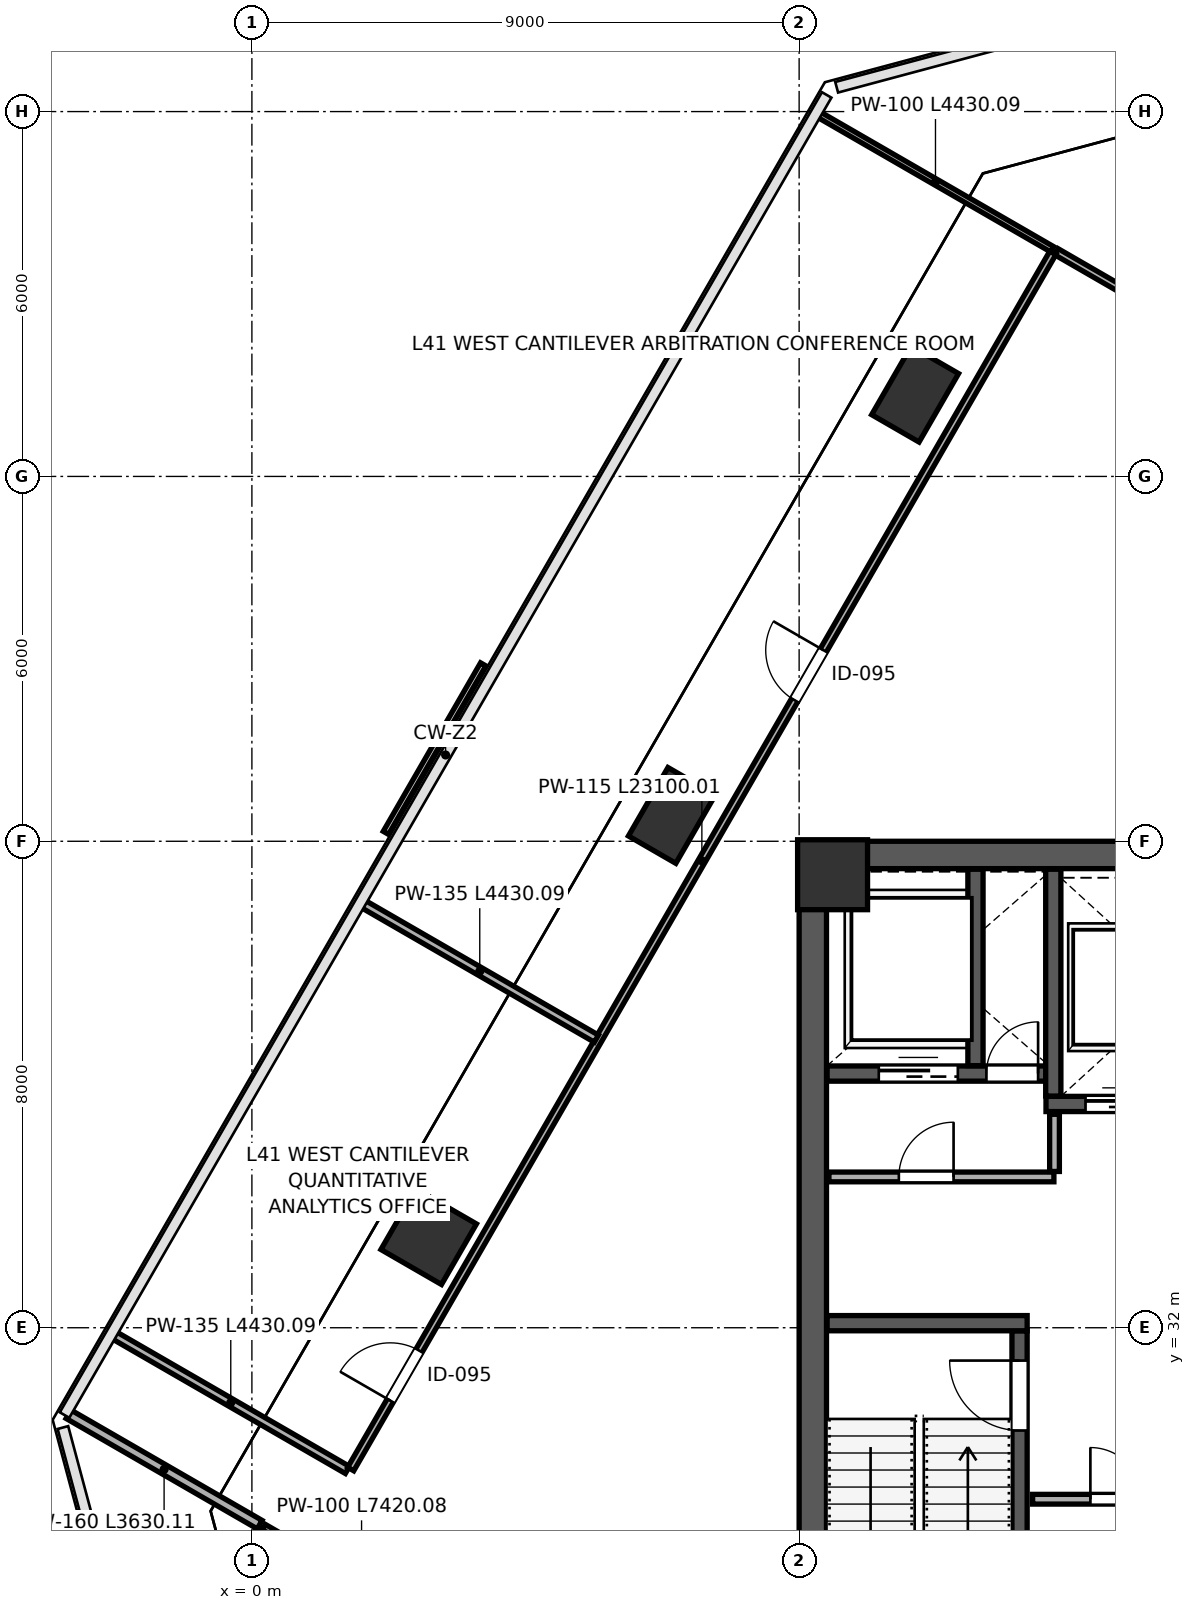
"""IFC4 building model, lengths in metres.
Left out: names, types, materials, properties, quantities, classifications, styles, units other than length and angle.
Written with IfcOpenShell. Run it as: python <this file> out.ifc"""

import sys

from ifc_helpers import new_model, si_unit, direction, frame, frame_2d, origin, origin_2d, place, context, subcontext, project, spatial, rectangle, extrude, clip, halfspace, source, transform, mapped, element, fill, save


model = new_model("IFC4")
c1 = context("Model", 3, precision=1e-05, world=origin(), true_north=direction((0.0, 1.0)))
c2 = subcontext(c1, "Body", "Model", "MODEL_VIEW")
j1 = project(units=[si_unit("LENGTHUNIT", "METRE"), si_unit("PLANEANGLEUNIT", "RADIAN")], contexts=[c1])
p1 = place(None, origin())
s1 = spatial("IfcSite", under=j1, at=p1, CompositionType="ELEMENT")
p2 = place(p1, origin())
s2 = spatial("IfcBuilding", under=s1, at=p2, CompositionType="ELEMENT")
p3 = place(p2, frame((0.0, 0.0, 183.4)))
s3 = spatial("IfcBuildingStorey", under=s2, at=p3, CompositionType="ELEMENT", Elevation=183.4)
m1 = source(origin(), c2, "Body", "SweptSolid", [
    extrude(rectangle(XDim=1.15, YDim=1.15, at=origin_2d()), origin(), (0.0, 0.0, 1.0), 4.199),
])
p4 = place(p3, frame((9.55, 39.45, 0.001), z_axis=(0.0, 0.0, 1.0), x_axis=(1.0, 0.0, 0.0)))
e1 = element("IfcColumn", 1, at=p4, inside=s3, PredefinedType="COLUMN", context=c2, shape_type="MappedRepresentation", body=[
    mapped(m1, transform((0.0, 0.0, 0.0), scale=1.0)),
])
p5 = place(p3, frame((2.907, 33.497, 0.0), z_axis=(0.019402010534, 0.18922666744, 0.981741733002), x_axis=(0.811440649841, -0.576643979736, 0.095109370836)))
e2 = element("IfcColumn", 2, at=p5, inside=s3, PredefinedType="COLUMN", context=c2, shape_type="Clipping", body=[
    clip(clip(extrude(rectangle(XDim=1.15, YDim=1.15, at=origin_2d()), origin(), (0.0, 0.0, 1.0), 4.278), halfspace(frame((0.0, 0.0, 0.153), z_axis=(0.0, 0.0, -1.0), x_axis=(1.0, 0.0, 0.0)), False)), halfspace(frame((0.0, 0.0, 4.125), z_axis=(0.0, 0.0, 1.0), x_axis=(1.0, 0.0, 0.0)), False)),
])
p6 = place(p3, frame((6.907, 40.425, 0.0), z_axis=(0.089433565091, 0.147376438249, 0.985028843681), x_axis=(0.484857640609, -0.870335294047, 0.086194804246)))
e3 = element("IfcColumn", 3, at=p6, inside=s3, PredefinedType="PILASTER", context=c2, shape_type="Clipping", body=[
    clip(clip(extrude(rectangle(XDim=0.9, YDim=1.3, at=origin_2d()), origin(), (0.0, 0.0, 1.0), 4.264), halfspace(frame((0.0, 0.0, 0.139), z_axis=(0.0, 0.0, -1.0), x_axis=(1.0, 0.0, 0.0)), False)), halfspace(frame((0.0, 0.0, 4.125), z_axis=(0.0, 0.0, 1.0), x_axis=(1.0, 0.0, 0.0)), False)),
])
p7 = place(p3, frame((10.907, 47.353, 0.0), z_axis=(0.158925035216, 0.104542428911, 0.981740145731), x_axis=(0.065841652164, -0.993286617888, 0.095113466792)))
e4 = element("IfcColumn", 4, at=p7, inside=s3, PredefinedType="PILASTER", context=c2, shape_type="Clipping", body=[
    clip(clip(extrude(rectangle(XDim=0.9, YDim=1.3, at=origin_2d()), origin(), (0.0, 0.0, 1.0), 4.278), halfspace(frame((0.0, 0.0, 0.153), z_axis=(0.0, 0.0, -1.0), x_axis=(1.0, 0.0, 0.0)), False)), halfspace(frame((0.0, 0.0, 4.125), z_axis=(0.0, 0.0, 1.0), x_axis=(1.0, 0.0, 0.0)), False)),
])
p8 = place(p3, frame((9.225, 24.45, 0.0), z_axis=(0.0, 0.0, 1.0), x_axis=(0.0, 1.0, 0.0)))
e5 = element("IfcWall", 5, at=p8, inside=s3, PredefinedType="SHEAR", context=c2, shape_type="SweptSolid", body=[
    extrude(rectangle(XDim=15.1, YDim=0.45, at=frame_2d((7.55, 0.0))), origin(), (0.0, 0.0, 1.0), 3.96),
])
p9 = place(p3, frame((9.0, 39.775, 0.0), z_axis=(0.0, 0.0, 1.0), x_axis=(1.0, 0.0, 0.0)))
e6 = element("IfcWall", 6, at=p9, inside=s3, PredefinedType="SHEAR", context=c2, shape_type="SweptSolid", body=[
    extrude(rectangle(XDim=18.0, YDim=0.45, at=frame_2d((9.0, 0.0))), origin(), (0.0, 0.0, 1.0), 3.96),
])
p10 = place(p3, frame((12.625, 24.46, 0.0), z_axis=(0.0, 0.0, 1.0), x_axis=(0.0, 1.0, 0.0)))
e7 = element("IfcWall", 7, at=p10, inside=s3, PredefinedType="SHEAR", context=c2, shape_type="SweptSolid", body=[
    extrude(rectangle(XDim=7.49, YDim=0.25, at=frame_2d((3.745, 0.0))), origin(), (0.0, 0.0, 1.0), 3.96),
])
p11 = place(p10, frame((5.85, 0.0, 0.0)))
e8 = element("IfcOpeningElement", 8, at=p11, cuts=e7, PredefinedType="OPENING", context=c2, shape_type="SweptSolid", body=[
    extrude(rectangle(XDim=1.15, YDim=2.2, at=frame_2d((0.575, 1.1))), frame((0.0, 0.135, 0.0), z_axis=(0.0, -1.0, 0.0), x_axis=(1.0, 0.0, 0.0)), (0.0, 0.0, 1.0), 0.27),
])
p12 = place(p3, frame((9.46, 32.075, 0.0), z_axis=(0.0, 0.0, 1.0), x_axis=(1.0, 0.0, 0.0)))
e9 = element("IfcWall", 9, at=p12, inside=s3, PredefinedType="SHEAR", context=c2, shape_type="SweptSolid", body=[
    extrude(rectangle(XDim=3.29, YDim=0.25, at=frame_2d((1.645, 0.0))), origin(), (0.0, 0.0, 1.0), 3.96),
])
p13 = place(p3, frame((9.46, 36.18, 0.0), z_axis=(0.0, 0.0, 1.0), x_axis=(1.0, 0.0, 0.0)))
e10 = element("IfcWall", 10, at=p13, inside=s3, PredefinedType="SHEAR", context=c2, shape_type="SweptSolid", body=[
    extrude(rectangle(XDim=3.79, YDim=0.25, at=frame_2d((1.895, 0.0))), origin(), (0.0, 0.0, 1.0), 3.96),
])
p14 = place(p13, frame((2.62, 0.0, 0.0)))
e11 = element("IfcOpeningElement", 11, at=p14, cuts=e10, PredefinedType="OPENING", context=c2, shape_type="SweptSolid", body=[
    extrude(rectangle(XDim=0.85, YDim=2.1, at=frame_2d((0.425, 1.05))), frame((0.0, 0.135, 0.0), z_axis=(0.0, -1.0, 0.0), x_axis=(1.0, 0.0, 0.0)), (0.0, 0.0, 1.0), 0.27),
])
p15 = place(p13, frame((0.85, 0.0, 0.0)))
e12 = element("IfcOpeningElement", 12, at=p15, cuts=e10, PredefinedType="OPENING", context=c2, shape_type="SweptSolid", body=[
    extrude(rectangle(XDim=1.3, YDim=2.25, at=frame_2d((0.65, 1.125))), frame((0.0, 0.135, 0.0), z_axis=(0.0, -1.0, 0.0), x_axis=(1.0, 0.0, 0.0)), (0.0, 0.0, 1.0), 0.27),
])
p16 = place(p3, frame((11.9, 36.31, 0.0), z_axis=(0.0, 0.0, 1.0), x_axis=(0.0, 1.0, 0.0)))
e13 = element("IfcWall", 13, at=p16, inside=s3, PredefinedType="SHEAR", context=c2, shape_type="SweptSolid", body=[
    extrude(rectangle(XDim=3.23, YDim=0.25, at=frame_2d((1.615, 0.0))), origin(), (0.0, 0.0, 1.0), 3.96),
])
p17 = place(p3, frame((13.06, 35.68, 0.0), z_axis=(0.0, 0.0, 1.0), x_axis=(1.0, 0.0, 0.0)))
e14 = element("IfcWall", 14, at=p17, inside=s3, PredefinedType="SHEAR", context=c2, shape_type="SweptSolid", body=[
    extrude(rectangle(XDim=4.25, YDim=0.25, at=frame_2d((2.125, 0.0))), origin(), (0.0, 0.0, 1.0), 3.96),
])
p18 = place(p17, frame((0.65, 0.0, 0.0)))
e15 = element("IfcOpeningElement", 15, at=p18, cuts=e14, PredefinedType="OPENING", context=c2, shape_type="SweptSolid", body=[
    extrude(rectangle(XDim=1.1, YDim=2.2, at=frame_2d((0.55, 1.1))), frame((0.0, 0.135, 0.0), z_axis=(0.0, -1.0, 0.0), x_axis=(1.0, 0.0, 0.0)), (0.0, 0.0, 1.0), 0.27),
])
p19 = place(p17, frame((2.65, 0.0, 0.0)))
e16 = element("IfcOpeningElement", 16, at=p19, cuts=e14, PredefinedType="OPENING", context=c2, shape_type="SweptSolid", body=[
    extrude(rectangle(XDim=1.1, YDim=2.2, at=frame_2d((0.55, 1.1))), frame((0.0, 0.135, 0.0), z_axis=(0.0, -1.0, 0.0), x_axis=(1.0, 0.0, 0.0)), (0.0, 0.0, 1.0), 0.27),
])
p20 = place(p3, frame((13.18, 35.81, 0.0), z_axis=(0.0, 0.0, 1.0), x_axis=(0.0, 1.0, 0.0)))
e17 = element("IfcWall", 17, at=p20, inside=s3, PredefinedType="SHEAR", context=c2, shape_type="SweptSolid", body=[
    extrude(rectangle(XDim=3.73, YDim=0.25, at=frame_2d((1.865, 0.0))), origin(), (0.0, 0.0, 1.0), 3.96),
])
p21 = place(p3, frame((9.49, 34.48, 0.0), z_axis=(0.0, 0.0, 1.0), x_axis=(1.0, 0.0, 0.0)))
e18 = element("IfcWall", 18, at=p21, inside=s3, PredefinedType="PARTITIONING", context=c2, shape_type="SweptSolid", body=[
    extrude(rectangle(XDim=3.7, YDim=0.16, at=frame_2d((1.85, 0.0))), origin(), (0.0, 0.0, 1.0), 3.96),
])
p22 = place(p21, frame((1.15, 0.0, 0.0)))
e19 = element("IfcOpeningElement", 19, at=p22, cuts=e18, PredefinedType="OPENING", context=c2, shape_type="SweptSolid", body=[
    extrude(rectangle(XDim=0.9, YDim=2.15, at=frame_2d((0.45, 1.075))), frame((0.0, 0.09, 0.0), z_axis=(0.0, -1.0, 0.0), x_axis=(1.0, 0.0, 0.0)), (0.0, 0.0, 1.0), 0.18),
])
p23 = place(p3, frame((13.2, 34.57, 0.0), z_axis=(0.0, 0.0, 1.0), x_axis=(0.0, 1.0, 0.0)))
e20 = element("IfcWall", 20, at=p23, inside=s3, PredefinedType="PARTITIONING", context=c2, shape_type="SweptSolid", body=[
    extrude(rectangle(XDim=0.94, YDim=0.16, at=frame_2d((0.47, 0.0))), origin(), (0.0, 0.0, 1.0), 3.96),
])
p24 = place(p3, frame((12.84, 29.18, 0.0), z_axis=(0.0, 0.0, 1.0), x_axis=(1.0, 0.0, 0.0)))
e21 = element("IfcWall", 21, at=p24, inside=s3, PredefinedType="PARTITIONING", context=c2, shape_type="SweptSolid", body=[
    extrude(rectangle(XDim=8.37, YDim=0.16, at=frame_2d((4.185, 0.0))), origin(), (0.0, 0.0, 1.0), 3.96),
])
p25 = place(p24, frame((0.95, 0.0, 0.0)))
e22 = element("IfcOpeningElement", 22, at=p25, cuts=e21, PredefinedType="OPENING", context=c2, shape_type="SweptSolid", body=[
    extrude(rectangle(XDim=0.85, YDim=2.1, at=frame_2d((0.425, 1.05))), frame((0.0, 0.09, 0.0), z_axis=(0.0, -1.0, 0.0), x_axis=(1.0, 0.0, 0.0)), (0.0, 0.0, 1.0), 0.18),
])
p26 = place(p24, frame((4.2, 0.0, 0.0)))
e23 = element("IfcOpeningElement", 23, at=p26, cuts=e21, PredefinedType="OPENING", context=c2, shape_type="SweptSolid", body=[
    extrude(rectangle(XDim=0.85, YDim=2.1, at=frame_2d((0.425, 1.05))), frame((0.0, 0.09, 0.0), z_axis=(0.0, -1.0, 0.0), x_axis=(1.0, 0.0, 0.0)), (0.0, 0.0, 1.0), 0.18),
])
p27 = place(p3, frame((-1.749, 25.432, 0.0), z_axis=(0.0, 0.0, 1.0), x_axis=(0.500013012896, 0.866017890655, 0.0)))
e24 = element("IfcWall", 24, at=p27, inside=s3, PredefinedType="PARTITIONING", context=c2, shape_type="SweptSolid", body=[
    extrude(rectangle(XDim=3.782, YDim=0.115, at=frame_2d((1.891, 0.0))), origin(), (0.0, 0.0, 1.0), 3.96),
])
p28 = place(p3, frame((-3.016, 30.577, 0.0), z_axis=(0.0, 0.0, 1.0), x_axis=(0.866011990707, -0.500023231413, 0.0)))
e25 = element("IfcWall", 25, at=p28, inside=s3, PredefinedType="PARTITIONING", context=c2, shape_type="SweptSolid", body=[
    extrude(rectangle(XDim=3.63, YDim=0.16, at=frame_2d((1.815, 0.0))), origin(), (0.0, 0.0, 1.0), 3.96),
])
p29 = place(p3, frame((0.197, 28.722, 0.0), z_axis=(0.0, 0.0, 1.0), x_axis=(0.866017374541, -0.5000139068, 0.0)))
e26 = element("IfcWall", 26, at=p29, inside=s3, PredefinedType="PARTITIONING", context=c2, shape_type="SweptSolid", body=[
    extrude(rectangle(XDim=7.42, YDim=0.1, at=frame_2d((3.71, 0.0))), origin(), (0.0, 0.0, 1.0), 3.96),
])
p30 = place(p29, frame((2.9, 0.0, 0.0)))
e27 = element("IfcOpeningElement", 27, at=p30, cuts=e26, PredefinedType="OPENING", context=c2, shape_type="SweptSolid", body=[
    extrude(rectangle(XDim=0.9, YDim=2.15, at=frame_2d((0.45, 1.075))), frame((0.0, 0.06, 0.0), z_axis=(0.0, -1.0, 0.0), x_axis=(1.0, 0.0, 0.0)), (0.0, 0.0, 1.0), 0.12),
])
p31 = place(p29, frame((5.0, 0.0, 0.0)))
e28 = element("IfcOpeningElement", 28, at=p31, cuts=e26, PredefinedType="OPENING", context=c2, shape_type="SweptSolid", body=[
    extrude(rectangle(XDim=0.95, YDim=2.15, at=frame_2d((0.475, 1.075))), frame((0.0, 0.06, 0.0), z_axis=(0.0, -1.0, 0.0), x_axis=(1.0, 0.0, 0.0)), (0.0, 0.0, 1.0), 0.12),
])
p32 = place(p3, frame((13.23, 49.696, 0.0), z_axis=(0.0, 0.0, 1.0), x_axis=(0.866026251752, -0.499998531275, 0.0)))
e29 = element("IfcWall", 29, at=p32, inside=s3, PredefinedType="PARTITIONING", context=c2, shape_type="SweptSolid", body=[
    extrude(rectangle(XDim=26.69, YDim=0.115, at=frame_2d((13.345, 0.0))), origin(), (0.0, 0.0, 1.0), 3.96),
])
p33 = place(p32, frame((2.1, 0.0, 0.0)))
e30 = element("IfcOpeningElement", 30, at=p33, cuts=e29, PredefinedType="OPENING", context=c2, shape_type="SweptSolid", body=[
    extrude(rectangle(XDim=0.95, YDim=2.15, at=frame_2d((0.475, 1.075))), frame((0.0, 0.067, 0.0), z_axis=(0.0, -1.0, 0.0), x_axis=(1.0, 0.0, 0.0)), (0.0, 0.0, 1.0), 0.135),
])
p34 = place(p32, frame((18.2, 0.0, 0.0)))
e31 = element("IfcOpeningElement", 31, at=p34, cuts=e29, PredefinedType="OPENING", context=c2, shape_type="SweptSolid", body=[
    extrude(rectangle(XDim=0.95, YDim=2.15, at=frame_2d((0.475, 1.075))), frame((0.0, 0.067, 0.0), z_axis=(0.0, -1.0, 0.0), x_axis=(1.0, 0.0, 0.0)), (0.0, 0.0, 1.0), 0.135),
])
p35 = place(p3, frame((-2.266, 31.876, 0.0), z_axis=(0.0, 0.0, 1.0), x_axis=(0.866026823135, -0.499997541604, 0.0)))
e32 = element("IfcWall", 32, at=p35, inside=s3, PredefinedType="PARTITIONING", context=c2, shape_type="SweptSolid", body=[
    extrude(rectangle(XDim=4.43, YDim=0.135, at=frame_2d((2.215, 0.0))), origin(), (0.0, 0.0, 1.0), 3.96),
])
p36 = place(p3, frame((1.625, 29.676, 0.0), z_axis=(0.0, 0.0, 1.0), x_axis=(0.500002707681, 0.866023840498, 0.0)))
e33 = element("IfcWall", 33, at=p36, inside=s3, PredefinedType="PARTITIONING", context=c2, shape_type="SweptSolid", body=[
    extrude(rectangle(XDim=23.1, YDim=0.115, at=frame_2d((11.55, 0.0))), origin(), (0.0, 0.0, 1.0), 3.96),
])
p37 = place(p36, frame((1.3, 0.0, 0.0)))
e34 = element("IfcOpeningElement", 34, at=p37, cuts=e33, PredefinedType="OPENING", context=c2, shape_type="SweptSolid", body=[
    extrude(rectangle(XDim=0.95, YDim=2.15, at=frame_2d((0.475, 1.075))), frame((0.0, 0.067, 0.0), z_axis=(0.0, -1.0, 0.0), x_axis=(1.0, 0.0, 0.0)), (0.0, 0.0, 1.0), 0.135),
])
p38 = place(p36, frame((14.6, 0.0, 0.0)))
e35 = element("IfcOpeningElement", 35, at=p38, cuts=e33, PredefinedType="OPENING", context=c2, shape_type="SweptSolid", body=[
    extrude(rectangle(XDim=0.95, YDim=2.15, at=frame_2d((0.475, 1.075))), frame((0.0, 0.067, 0.0), z_axis=(0.0, -1.0, 0.0), x_axis=(1.0, 0.0, 0.0)), (0.0, 0.0, 1.0), 0.135),
])
p39 = place(p3, frame((9.324, 51.951, 0.0), z_axis=(0.0, 0.0, 1.0), x_axis=(0.866036909293, -0.499980071345, 0.0)))
e36 = element("IfcWall", 36, at=p39, inside=s3, PredefinedType="PARTITIONING", context=c2, shape_type="SweptSolid", body=[
    extrude(rectangle(XDim=4.43, YDim=0.1, at=frame_2d((2.215, 0.0))), origin(), (0.0, 0.0, 1.0), 3.96),
])
p40 = place(p3, frame((1.829, 38.969, 0.0), z_axis=(0.0, 0.0, 1.0), x_axis=(0.866050685319, -0.499956208541, 0.0)))
e37 = element("IfcWall", 37, at=p40, inside=s3, PredefinedType="PARTITIONING", context=c2, shape_type="SweptSolid", body=[
    extrude(rectangle(XDim=4.43, YDim=0.135, at=frame_2d((2.215, 0.0))), origin(), (0.0, 0.0, 1.0), 3.195),
])
m2 = source(origin(), c2, "Body", "SweptSolid", [
    extrude(rectangle(XDim=1.15, YDim=2.2, at=frame_2d((0.575, 1.1))), frame((0.0, 0.025, 0.0), z_axis=(0.0, -1.0, 0.0), x_axis=(1.0, 0.0, 0.0)), (0.0, 0.0, 1.0), 0.05),
])
p41 = place(p11, origin())
e38 = element("IfcDoor", 38, at=p41, inside=s3, OperationType="SINGLE_SWING_RIGHT", PredefinedType="DOOR", context=c2, shape_type="MappedRepresentation", body=[
    mapped(m2, transform((0.0, 0.0, 0.0), scale=1.0)),
])
fill(e8, e38)
m3 = source(origin(), c2, "Body", "SweptSolid", [
    extrude(rectangle(XDim=0.85, YDim=2.1, at=frame_2d((0.425, 1.05))), frame((0.0, 0.025, 0.0), z_axis=(0.0, -1.0, 0.0), x_axis=(1.0, 0.0, 0.0)), (0.0, 0.0, 1.0), 0.05),
])
p42 = place(p14, origin())
e39 = element("IfcDoor", 39, at=p42, inside=s3, OperationType="SINGLE_SWING_RIGHT", PredefinedType="DOOR", context=c2, shape_type="MappedRepresentation", body=[
    mapped(m3, transform((0.0, 0.0, 0.0), scale=1.0)),
])
fill(e11, e39)
m4 = source(origin(), c2, "Body", "SweptSolid", [
    extrude(rectangle(XDim=1.1, YDim=2.2, at=frame_2d((0.55, 1.1))), frame((0.0, 0.025, 0.0), z_axis=(0.0, -1.0, 0.0), x_axis=(1.0, 0.0, 0.0)), (0.0, 0.0, 1.0), 0.05),
])
p43 = place(p18, origin())
e40 = element("IfcDoor", 40, at=p43, inside=s3, OperationType="SLIDING_TO_LEFT", PredefinedType="DOOR", context=c2, shape_type="MappedRepresentation", body=[
    mapped(m4, transform((0.0, 0.0, 0.0), scale=1.0)),
])
fill(e15, e40)
m5 = source(origin(), c2, "Body", "SweptSolid", [
    extrude(rectangle(XDim=1.3, YDim=2.25, at=frame_2d((0.65, 1.125))), frame((0.0, 0.025, 0.0), z_axis=(0.0, -1.0, 0.0), x_axis=(1.0, 0.0, 0.0)), (0.0, 0.0, 1.0), 0.05),
])
p44 = place(p15, origin())
e41 = element("IfcDoor", 41, at=p44, inside=s3, OperationType="SLIDING_TO_LEFT", PredefinedType="DOOR", context=c2, shape_type="MappedRepresentation", body=[
    mapped(m5, transform((0.0, 0.0, 0.0), scale=1.0)),
])
fill(e12, e41)
m6 = source(origin(), c2, "Body", "SweptSolid", [
    extrude(rectangle(XDim=0.9, YDim=2.15, at=frame_2d((0.45, 1.075))), frame((0.0, 0.025, 0.0), z_axis=(0.0, -1.0, 0.0), x_axis=(1.0, 0.0, 0.0)), (0.0, 0.0, 1.0), 0.05),
])
p45 = place(p22, origin())
e42 = element("IfcDoor", 42, at=p45, inside=s3, OperationType="SINGLE_SWING_RIGHT", PredefinedType="DOOR", context=c2, shape_type="MappedRepresentation", body=[
    mapped(m6, transform((0.0, 0.0, 0.0), scale=1.0)),
])
fill(e19, e42)
p46 = place(p25, origin())
e43 = element("IfcDoor", 43, at=p46, inside=s3, OperationType="SINGLE_SWING_LEFT", PredefinedType="DOOR", context=c2, shape_type="MappedRepresentation", body=[
    mapped(m3, transform((0.0, 0.0, 0.0), scale=1.0)),
])
fill(e22, e43)
m7 = source(origin(), c2, "Body", "SweptSolid", [
    extrude(rectangle(XDim=0.95, YDim=2.15, at=frame_2d((0.475, 1.075))), frame((0.0, 0.025, 0.0), z_axis=(0.0, -1.0, 0.0), x_axis=(1.0, 0.0, 0.0)), (0.0, 0.0, 1.0), 0.05),
])
p47 = place(p37, origin())
e44 = element("IfcDoor", 44, at=p47, inside=s3, OperationType="SINGLE_SWING_LEFT", PredefinedType="DOOR", context=c2, shape_type="MappedRepresentation", body=[
    mapped(m7, transform((0.0, 0.0, 0.0), scale=1.0)),
])
fill(e34, e44)
p48 = place(p38, origin())
e45 = element("IfcDoor", 45, at=p48, inside=s3, OperationType="SINGLE_SWING_RIGHT", PredefinedType="DOOR", context=c2, shape_type="MappedRepresentation", body=[
    mapped(m7, transform((0.0, 0.0, 0.0), scale=1.0)),
])
fill(e35, e45)
save(model, sys.argv[1])
